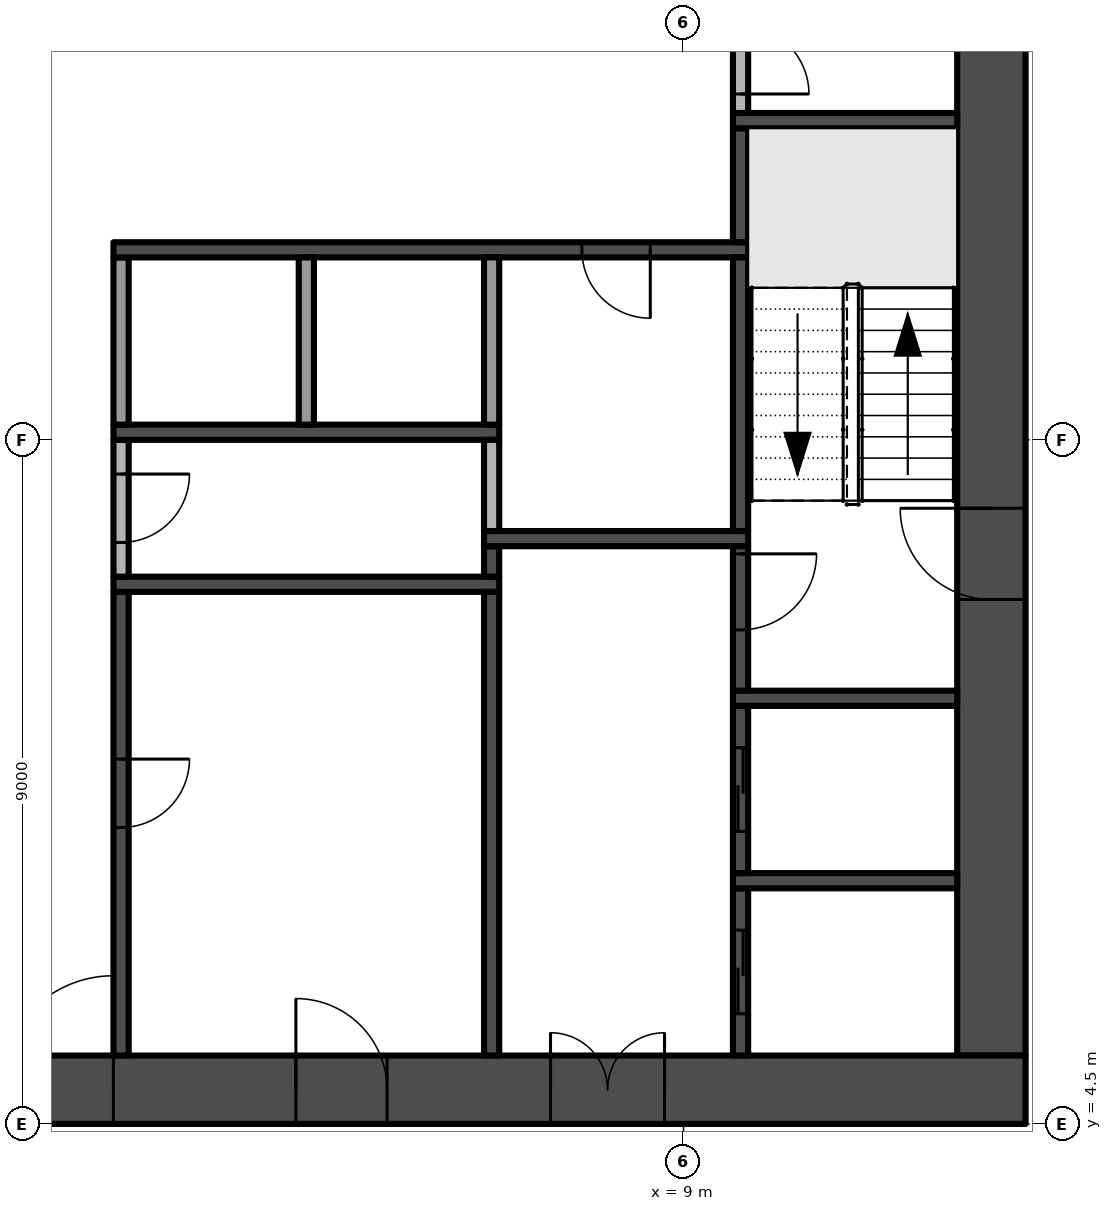
"""IFC4 building model, lengths in metres.
Left out: names, types, materials, properties, quantities, classifications, styles, units other than length and angle.
Written with IfcOpenShell. Run it as: python <this file> out.ifc"""

import sys

from ifc_helpers import new_model, si_unit, direction, frame, frame_2d, origin, place, context, subcontext, project, spatial, rectangle, extrude, element, fill, save


model = new_model("IFC4")
c1 = context("Model", 3, precision=1e-05, world=origin(), true_north=direction((0.0, 1.0)))
c2 = subcontext(c1, "Body", "Model", "MODEL_VIEW")
j1 = project(units=[si_unit("LENGTHUNIT", "METRE"), si_unit("PLANEANGLEUNIT", "RADIAN")], contexts=[c1])
p1 = place(None, origin())
s1 = spatial("IfcSite", under=j1, at=p1, CompositionType="ELEMENT")
p2 = place(p1, origin())
s2 = spatial("IfcBuilding", under=s1, at=p2, CompositionType="ELEMENT")
p3 = place(p2, frame((0.0, 0.0, 18.8)))
s3 = spatial("IfcBuildingStorey", under=s2, at=p3, CompositionType="ELEMENT", Elevation=18.8)
p4 = place(p3, frame((-13.5, 4.95, -0.3), z_axis=(0.0, 0.0, 1.0), x_axis=(1.0, 0.0, 0.0)))
e1 = element("IfcWall", 1, at=p4, inside=s3, PredefinedType="SHEAR", context=c2, shape_type="SweptSolid", body=[
    extrude(rectangle(XDim=27.0, YDim=0.9, at=frame_2d((13.5, 0.0))), origin(), (0.0, 0.0, 1.0), 3.8),
])
p5 = place(p4, frame((12.0, 0.0, 0.3)))
e2 = element("IfcOpeningElement", 2, at=p5, cuts=e1, PredefinedType="OPENING", context=c2, shape_type="SweptSolid", body=[
    extrude(rectangle(XDim=3.0, YDim=2.4, at=frame_2d((1.5, 1.2))), frame((0.0, 0.46, 0.0), z_axis=(0.0, -1.0, 0.0), x_axis=(1.0, 0.0, 0.0)), (0.0, 0.0, 1.0), 0.92),
])
p6 = place(p4, frame((4.9, 0.0, 0.3)))
e3 = element("IfcOpeningElement", 3, at=p6, cuts=e1, PredefinedType="OPENING", context=c2, shape_type="SweptSolid", body=[
    extrude(rectangle(XDim=1.2, YDim=2.2, at=frame_2d((0.6, 1.1))), frame((0.0, 0.46, 0.0), z_axis=(0.0, -1.0, 0.0), x_axis=(1.0, 0.0, 0.0)), (0.0, 0.0, 1.0), 0.92),
])
p7 = place(p4, frame((20.75, 0.0, 0.3)))
e4 = element("IfcOpeningElement", 4, at=p7, cuts=e1, PredefinedType="OPENING", context=c2, shape_type="SweptSolid", body=[
    extrude(rectangle(XDim=1.5, YDim=2.2, at=frame_2d((0.75, 1.1))), frame((0.0, 0.46, 0.0), z_axis=(0.0, -1.0, 0.0), x_axis=(1.0, 0.0, 0.0)), (0.0, 0.0, 1.0), 0.92),
])
p8 = place(p4, frame((17.4, 0.0, 0.3)))
e5 = element("IfcOpeningElement", 5, at=p8, cuts=e1, PredefinedType="OPENING", context=c2, shape_type="SweptSolid", body=[
    extrude(rectangle(XDim=1.2, YDim=2.2, at=frame_2d((0.6, 1.1))), frame((0.0, 0.46, 0.0), z_axis=(0.0, -1.0, 0.0), x_axis=(1.0, 0.0, 0.0)), (0.0, 0.0, 1.0), 0.92),
])
p9 = place(p3, frame((13.05, 5.4, -0.3), z_axis=(0.0, 0.0, 1.0), x_axis=(0.0, 1.0, 0.0)))
e6 = element("IfcWall", 6, at=p9, inside=s3, PredefinedType="SHEAR", context=c2, shape_type="SweptSolid", body=[
    extrude(rectangle(XDim=16.2, YDim=0.9, at=frame_2d((8.1, 0.0))), origin(), (0.0, 0.0, 1.0), 3.8),
])
p10 = place(p9, frame((6.0, 0.0, 0.3)))
e7 = element("IfcOpeningElement", 7, at=p10, cuts=e6, PredefinedType="OPENING", context=c2, shape_type="SweptSolid", body=[
    extrude(rectangle(XDim=1.2, YDim=2.2, at=frame_2d((0.6, 1.1))), frame((0.0, 0.46, 0.0), z_axis=(0.0, -1.0, 0.0), x_axis=(1.0, 0.0, 0.0)), (0.0, 0.0, 1.0), 0.92),
])
p11 = place(p3, frame((1.6, 11.5, 0.0), z_axis=(0.0, 0.0, 1.0), x_axis=(0.0, -1.0, 0.0)))
e8 = element("IfcWall", 8, at=p11, inside=s3, PredefinedType="SHEAR", context=c2, shape_type="SweptSolid", body=[
    extrude(rectangle(XDim=6.1, YDim=0.2, at=frame_2d((3.05, 0.0))), origin(), (0.0, 0.0, 1.0), 3.5),
])
p12 = place(p11, frame((2.2, 0.0, 0.0)))
e9 = element("IfcOpeningElement", 9, at=p12, cuts=e8, PredefinedType="OPENING", context=c2, shape_type="SweptSolid", body=[
    extrude(rectangle(XDim=0.9, YDim=2.1, at=frame_2d((0.45, 1.05))), frame((0.0, 0.11, 0.0), z_axis=(0.0, -1.0, 0.0), x_axis=(1.0, 0.0, 0.0)), (0.0, 0.0, 1.0), 0.22),
])
p13 = place(p3, frame((1.5, 11.6, 0.0), z_axis=(0.0, 0.0, 1.0), x_axis=(1.0, 0.0, 0.0)))
e10 = element("IfcWall", 10, at=p13, inside=s3, PredefinedType="SHEAR", context=c2, shape_type="SweptSolid", body=[
    extrude(rectangle(XDim=5.075, YDim=0.2, at=frame_2d((2.538, 0.0))), origin(), (0.0, 0.0, 1.0), 3.5),
])
p14 = place(p3, frame((1.6, 13.5, 0.0), z_axis=(0.0, 0.0, 1.0), x_axis=(0.0, -1.0, 0.0)))
e11 = element("IfcWall", 11, at=p14, inside=s3, PredefinedType="PARTITIONING", context=c2, shape_type="SweptSolid", body=[
    extrude(rectangle(XDim=1.8, YDim=0.2, at=frame_2d((0.9, 0.0))), origin(), (0.0, 0.0, 1.0), 3.5),
])
p15 = place(p14, frame((0.45, 0.0, 0.0)))
e12 = element("IfcOpeningElement", 12, at=p15, cuts=e11, PredefinedType="OPENING", context=c2, shape_type="SweptSolid", body=[
    extrude(rectangle(XDim=0.9, YDim=2.1, at=frame_2d((0.45, 1.05))), frame((0.0, 0.11, 0.0), z_axis=(0.0, -1.0, 0.0), x_axis=(1.0, 0.0, 0.0)), (0.0, 0.0, 1.0), 0.22),
])
p16 = place(p3, frame((1.5, 13.6, 0.0), z_axis=(0.0, 0.0, 1.0), x_axis=(1.0, 0.0, 0.0)))
e13 = element("IfcWall", 13, at=p16, inside=s3, PredefinedType="SHEAR", context=c2, shape_type="SweptSolid", body=[
    extrude(rectangle(XDim=5.075, YDim=0.2, at=frame_2d((2.538, 0.0))), origin(), (0.0, 0.0, 1.0), 3.5),
])
p17 = place(p3, frame((1.6, 13.7, 0.0), z_axis=(0.0, 0.0, 1.0), x_axis=(0.0, 1.0, 0.0)))
e14 = element("IfcWall", 14, at=p17, inside=s3, PredefinedType="PARTITIONING", context=c2, shape_type="SweptSolid", body=[
    extrude(rectangle(XDim=2.2, YDim=0.2, at=frame_2d((1.1, 0.0))), origin(), (0.0, 0.0, 1.0), 3.5),
])
p18 = place(p3, frame((9.85, 16.0, 0.0), z_axis=(0.0, 0.0, 1.0), x_axis=(-1.0, 0.0, 0.0)))
e15 = element("IfcWall", 15, at=p18, inside=s3, PredefinedType="SHEAR", context=c2, shape_type="SweptSolid", body=[
    extrude(rectangle(XDim=8.35, YDim=0.2, at=frame_2d((4.175, 0.0))), origin(), (0.0, 0.0, 1.0), 3.5),
])
p19 = place(p18, frame((1.288, 0.0, 0.0)))
e16 = element("IfcOpeningElement", 16, at=p19, cuts=e15, PredefinedType="OPENING", context=c2, shape_type="SweptSolid", body=[
    extrude(rectangle(XDim=0.9, YDim=2.1, at=frame_2d((0.45, 1.05))), frame((0.0, 0.11, 0.0), z_axis=(0.0, -1.0, 0.0), x_axis=(1.0, 0.0, 0.0)), (0.0, 0.0, 1.0), 0.22),
])
p20 = place(p3, frame((4.037, 13.7, 0.0), z_axis=(0.0, 0.0, 1.0), x_axis=(0.0, 1.0, 0.0)))
e17 = element("IfcWall", 17, at=p20, inside=s3, PredefinedType="PARTITIONING", context=c2, shape_type="SweptSolid", body=[
    extrude(rectangle(XDim=2.2, YDim=0.2, at=frame_2d((1.1, 0.0))), origin(), (0.0, 0.0, 1.0), 3.5),
])
p21 = place(p3, frame((6.475, 5.4, 0.0), z_axis=(0.0, 0.0, 1.0), x_axis=(0.0, 1.0, 0.0)))
e18 = element("IfcWall", 18, at=p21, inside=s3, PredefinedType="SHEAR", context=c2, shape_type="SweptSolid", body=[
    extrude(rectangle(XDim=6.1, YDim=0.2, at=frame_2d((3.05, 0.0))), origin(), (0.0, 0.0, 1.0), 3.5),
])
p22 = place(p3, frame((6.475, 11.7, 0.0), z_axis=(0.0, 0.0, 1.0), x_axis=(0.0, 1.0, 0.0)))
e19 = element("IfcWall", 19, at=p22, inside=s3, PredefinedType="SHEAR", context=c2, shape_type="SweptSolid", body=[
    extrude(rectangle(XDim=0.4, YDim=0.2, at=frame_2d((0.2, 0.0))), origin(), (0.0, 0.0, 1.0), 3.5),
])
p23 = place(p3, frame((6.375, 12.2, 0.0), z_axis=(0.0, 0.0, 1.0), x_axis=(1.0, 0.0, 0.0)))
e20 = element("IfcWall", 20, at=p23, inside=s3, PredefinedType="SHEAR", context=c2, shape_type="SweptSolid", body=[
    extrude(rectangle(XDim=3.475, YDim=0.2, at=frame_2d((1.738, 0.0))), origin(), (0.0, 0.0, 1.0), 3.5),
])
p24 = place(p3, frame((6.475, 12.3, 0.0), z_axis=(0.0, 0.0, 1.0), x_axis=(0.0, 1.0, 0.0)))
e21 = element("IfcWall", 21, at=p24, inside=s3, PredefinedType="PARTITIONING", context=c2, shape_type="SweptSolid", body=[
    extrude(rectangle(XDim=1.2, YDim=0.2, at=frame_2d((0.6, 0.0))), origin(), (0.0, 0.0, 1.0), 3.5),
])
p25 = place(p3, frame((6.475, 13.7, 0.0), z_axis=(0.0, 0.0, 1.0), x_axis=(0.0, 1.0, 0.0)))
e22 = element("IfcWall", 22, at=p25, inside=s3, PredefinedType="PARTITIONING", context=c2, shape_type="SweptSolid", body=[
    extrude(rectangle(XDim=2.2, YDim=0.2, at=frame_2d((1.1, 0.0))), origin(), (0.0, 0.0, 1.0), 3.5),
])
p26 = place(p3, frame((9.75, 5.4, 0.0), z_axis=(0.0, 0.0, 1.0), x_axis=(0.0, 1.0, 0.0)))
e23 = element("IfcWall", 23, at=p26, inside=s3, PredefinedType="SHEAR", context=c2, shape_type="SweptSolid", body=[
    extrude(rectangle(XDim=2.2, YDim=0.2, at=frame_2d((1.1, 0.0))), origin(), (0.0, 0.0, 1.0), 3.5),
])
p27 = place(p26, frame((0.55, 0.0, 0.0)))
e24 = element("IfcOpeningElement", 24, at=p27, cuts=e23, PredefinedType="OPENING", context=c2, shape_type="SweptSolid", body=[
    extrude(rectangle(XDim=1.1, YDim=2.1, at=frame_2d((0.55, 1.05))), frame((0.0, 0.11, 0.0), z_axis=(0.0, -1.0, 0.0), x_axis=(1.0, 0.0, 0.0)), (0.0, 0.0, 1.0), 0.22),
])
p28 = place(p3, frame((9.65, 7.7, 0.0), z_axis=(0.0, 0.0, 1.0), x_axis=(1.0, 0.0, 0.0)))
e25 = element("IfcWall", 25, at=p28, inside=s3, PredefinedType="SHEAR", context=c2, shape_type="SweptSolid", body=[
    extrude(rectangle(XDim=2.95, YDim=0.2, at=frame_2d((1.475, 0.0))), origin(), (0.0, 0.0, 1.0), 3.5),
])
p29 = place(p3, frame((9.75, 7.8, 0.0), z_axis=(0.0, 0.0, 1.0), x_axis=(0.0, 1.0, 0.0)))
e26 = element("IfcWall", 26, at=p29, inside=s3, PredefinedType="SHEAR", context=c2, shape_type="SweptSolid", body=[
    extrude(rectangle(XDim=2.2, YDim=0.2, at=frame_2d((1.1, 0.0))), origin(), (0.0, 0.0, 1.0), 3.5),
])
p30 = place(p29, frame((0.55, 0.0, 0.0)))
e27 = element("IfcOpeningElement", 27, at=p30, cuts=e26, PredefinedType="OPENING", context=c2, shape_type="SweptSolid", body=[
    extrude(rectangle(XDim=1.1, YDim=2.1, at=frame_2d((0.55, 1.05))), frame((0.0, 0.11, 0.0), z_axis=(0.0, -1.0, 0.0), x_axis=(1.0, 0.0, 0.0)), (0.0, 0.0, 1.0), 0.22),
])
p31 = place(p3, frame((9.65, 10.1, 0.0), z_axis=(0.0, 0.0, 1.0), x_axis=(1.0, 0.0, 0.0)))
e28 = element("IfcWall", 28, at=p31, inside=s3, PredefinedType="SHEAR", context=c2, shape_type="SweptSolid", body=[
    extrude(rectangle(XDim=2.95, YDim=0.2, at=frame_2d((1.475, 0.0))), origin(), (0.0, 0.0, 1.0), 3.5),
])
p32 = place(p3, frame((9.75, 12.1, 0.0), z_axis=(0.0, 0.0, 1.0), x_axis=(0.0, -1.0, 0.0)))
e29 = element("IfcWall", 29, at=p32, inside=s3, PredefinedType="SHEAR", context=c2, shape_type="SweptSolid", body=[
    extrude(rectangle(XDim=1.9, YDim=0.2, at=frame_2d((0.95, 0.0))), origin(), (0.0, 0.0, 1.0), 3.5),
])
p33 = place(p32, frame((0.1, 0.0, 0.0)))
e30 = element("IfcOpeningElement", 30, at=p33, cuts=e29, PredefinedType="OPENING", context=c2, shape_type="SweptSolid", body=[
    extrude(rectangle(XDim=1.0, YDim=2.2, at=frame_2d((0.5, 1.1))), frame((0.0, 0.11, 0.0), z_axis=(0.0, -1.0, 0.0), x_axis=(1.0, 0.0, 0.0)), (0.0, 0.0, 1.0), 0.22),
])
p34 = place(p3, frame((9.75, 12.3, 0.0), z_axis=(0.0, 0.0, 1.0), x_axis=(0.0, 1.0, 0.0)))
e31 = element("IfcWall", 31, at=p34, inside=s3, PredefinedType="SHEAR", context=c2, shape_type="SweptSolid", body=[
    extrude(rectangle(XDim=3.6, YDim=0.2, at=frame_2d((1.8, 0.0))), origin(), (0.0, 0.0, 1.0), 3.5),
])
p35 = place(p3, frame((9.75, 16.1, 0.0), z_axis=(0.0, 0.0, 1.0), x_axis=(0.0, 1.0, 0.0)))
e32 = element("IfcWall", 32, at=p35, inside=s3, PredefinedType="SHEAR", context=c2, shape_type="SweptSolid", body=[
    extrude(rectangle(XDim=1.5, YDim=0.2, at=frame_2d((0.75, 0.0))), origin(), (0.0, 0.0, 1.0), 3.5),
])
p36 = place(p3, frame((9.65, 17.7, 0.0), z_axis=(0.0, 0.0, 1.0), x_axis=(1.0, 0.0, 0.0)))
e33 = element("IfcWall", 33, at=p36, inside=s3, PredefinedType="SHEAR", context=c2, shape_type="SweptSolid", body=[
    extrude(rectangle(XDim=2.95, YDim=0.2, at=frame_2d((1.475, 0.0))), origin(), (0.0, 0.0, 1.0), 3.5),
])
p37 = place(p3, frame((9.75, 19.2, 0.0), z_axis=(0.0, 0.0, 1.0), x_axis=(0.0, -1.0, 0.0)))
e34 = element("IfcWall", 34, at=p37, inside=s3, PredefinedType="PARTITIONING", context=c2, shape_type="SweptSolid", body=[
    extrude(rectangle(XDim=1.4, YDim=0.2, at=frame_2d((0.7, 0.0))), origin(), (0.0, 0.0, 1.0), 3.5),
])
p38 = place(p37, frame((0.25, 0.0, 0.0)))
e35 = element("IfcOpeningElement", 35, at=p38, cuts=e34, PredefinedType="OPENING", context=c2, shape_type="SweptSolid", body=[
    extrude(rectangle(XDim=0.9, YDim=2.1, at=frame_2d((0.45, 1.05))), frame((0.0, 0.11, 0.0), z_axis=(0.0, -1.0, 0.0), x_axis=(1.0, 0.0, 0.0)), (0.0, 0.0, 1.0), 0.22),
])
p39 = place(p5, frame((3.0, 0.0, 0.0), z_axis=(0.0, 0.0, 1.0), x_axis=(-1.0, 0.0, 0.0)))
e36 = element("IfcDoor", 36, at=p39, inside=s3, OperationType="DOUBLE_DOOR_SINGLE_SWING", PredefinedType="DOOR", context=c2, shape_type="SweptSolid", body=[
    extrude(rectangle(XDim=3.0, YDim=2.4, at=frame_2d((1.5, 1.2))), frame((0.0, 0.025, 0.0), z_axis=(0.0, -1.0, 0.0), x_axis=(1.0, 0.0, 0.0)), (0.0, 0.0, 1.0), 0.05),
])
fill(e2, e36)
p40 = place(p10, frame((1.2, 0.0, 0.0), z_axis=(0.0, 0.0, 1.0), x_axis=(-1.0, 0.0, 0.0)))
e37 = element("IfcDoor", 37, at=p40, inside=s3, OperationType="SINGLE_SWING_LEFT", PredefinedType="DOOR", context=c2, shape_type="SweptSolid", body=[
    extrude(rectangle(XDim=1.2, YDim=2.2, at=frame_2d((0.6, 1.1))), frame((0.0, 0.025, 0.0), z_axis=(0.0, -1.0, 0.0), x_axis=(1.0, 0.0, 0.0)), (0.0, 0.0, 1.0), 0.05),
])
fill(e7, e37)
p41 = place(p7, frame((1.5, 0.0, 0.0), z_axis=(0.0, 0.0, 1.0), x_axis=(-1.0, 0.0, 0.0)))
e38 = element("IfcDoor", 38, at=p41, inside=s3, OperationType="DOUBLE_DOOR_SINGLE_SWING", PredefinedType="DOOR", context=c2, shape_type="SweptSolid", body=[
    extrude(rectangle(XDim=1.5, YDim=2.2, at=frame_2d((0.75, 1.1))), frame((0.0, 0.025, 0.0), z_axis=(0.0, -1.0, 0.0), x_axis=(1.0, 0.0, 0.0)), (0.0, 0.0, 1.0), 0.05),
])
fill(e4, e38)
p42 = place(p8, frame((1.2, 0.0, 0.0), z_axis=(0.0, 0.0, 1.0), x_axis=(-1.0, 0.0, 0.0)))
e39 = element("IfcDoor", 39, at=p42, inside=s3, OperationType="SINGLE_SWING_RIGHT", PredefinedType="DOOR", context=c2, shape_type="SweptSolid", body=[
    extrude(rectangle(XDim=1.2, YDim=2.2, at=frame_2d((0.6, 1.1))), frame((0.0, 0.025, 0.0), z_axis=(0.0, -1.0, 0.0), x_axis=(1.0, 0.0, 0.0)), (0.0, 0.0, 1.0), 0.05),
])
fill(e5, e39)
p43 = place(p33, origin())
e40 = element("IfcDoor", 40, at=p43, inside=s3, OperationType="SINGLE_SWING_LEFT", PredefinedType="DOOR", context=c2, shape_type="SweptSolid", body=[
    extrude(rectangle(XDim=1.0, YDim=2.2, at=frame_2d((0.5, 1.1))), frame((0.0, 0.025, 0.0), z_axis=(0.0, -1.0, 0.0), x_axis=(1.0, 0.0, 0.0)), (0.0, 0.0, 1.0), 0.05),
])
fill(e30, e40)
p44 = place(p27, origin())
e41 = element("IfcDoor", 41, at=p44, inside=s3, OperationType="SLIDING_TO_RIGHT", PredefinedType="DOOR", context=c2, shape_type="SweptSolid", body=[
    extrude(rectangle(XDim=1.1, YDim=2.1, at=frame_2d((0.55, 1.05))), frame((0.0, 0.025, 0.0), z_axis=(0.0, -1.0, 0.0), x_axis=(1.0, 0.0, 0.0)), (0.0, 0.0, 1.0), 0.05),
])
fill(e24, e41)
p45 = place(p30, origin())
e42 = element("IfcDoor", 42, at=p45, inside=s3, OperationType="SLIDING_TO_RIGHT", PredefinedType="DOOR", context=c2, shape_type="SweptSolid", body=[
    extrude(rectangle(XDim=1.1, YDim=2.1, at=frame_2d((0.55, 1.05))), frame((0.0, 0.025, 0.0), z_axis=(0.0, -1.0, 0.0), x_axis=(1.0, 0.0, 0.0)), (0.0, 0.0, 1.0), 0.05),
])
fill(e27, e42)
p46 = place(p12, origin())
e43 = element("IfcDoor", 43, at=p46, inside=s3, OperationType="SINGLE_SWING_LEFT", PredefinedType="DOOR", context=c2, shape_type="SweptSolid", body=[
    extrude(rectangle(XDim=0.9, YDim=2.1, at=frame_2d((0.45, 1.05))), frame((0.0, 0.025, 0.0), z_axis=(0.0, -1.0, 0.0), x_axis=(1.0, 0.0, 0.0)), (0.0, 0.0, 1.0), 0.05),
])
fill(e9, e43)
p47 = place(p15, origin())
e44 = element("IfcDoor", 44, at=p47, inside=s3, OperationType="SINGLE_SWING_LEFT", PredefinedType="DOOR", context=c2, shape_type="SweptSolid", body=[
    extrude(rectangle(XDim=0.9, YDim=2.1, at=frame_2d((0.45, 1.05))), frame((0.0, 0.025, 0.0), z_axis=(0.0, -1.0, 0.0), x_axis=(1.0, 0.0, 0.0)), (0.0, 0.0, 1.0), 0.05),
])
fill(e12, e44)
p48 = place(p19, origin())
e45 = element("IfcDoor", 45, at=p48, inside=s3, OperationType="SINGLE_SWING_LEFT", PredefinedType="DOOR", context=c2, shape_type="SweptSolid", body=[
    extrude(rectangle(XDim=0.9, YDim=2.1, at=frame_2d((0.45, 1.05))), frame((0.0, 0.025, 0.0), z_axis=(0.0, -1.0, 0.0), x_axis=(1.0, 0.0, 0.0)), (0.0, 0.0, 1.0), 0.05),
])
fill(e16, e45)
p49 = place(p38, origin())
e46 = element("IfcDoor", 46, at=p49, inside=s3, OperationType="SINGLE_SWING_RIGHT", PredefinedType="DOOR", context=c2, shape_type="SweptSolid", body=[
    extrude(rectangle(XDim=0.9, YDim=2.1, at=frame_2d((0.45, 1.05))), frame((0.0, 0.025, 0.0), z_axis=(0.0, -1.0, 0.0), x_axis=(1.0, 0.0, 0.0)), (0.0, 0.0, 1.0), 0.05),
])
fill(e35, e46)
save(model, sys.argv[1])
